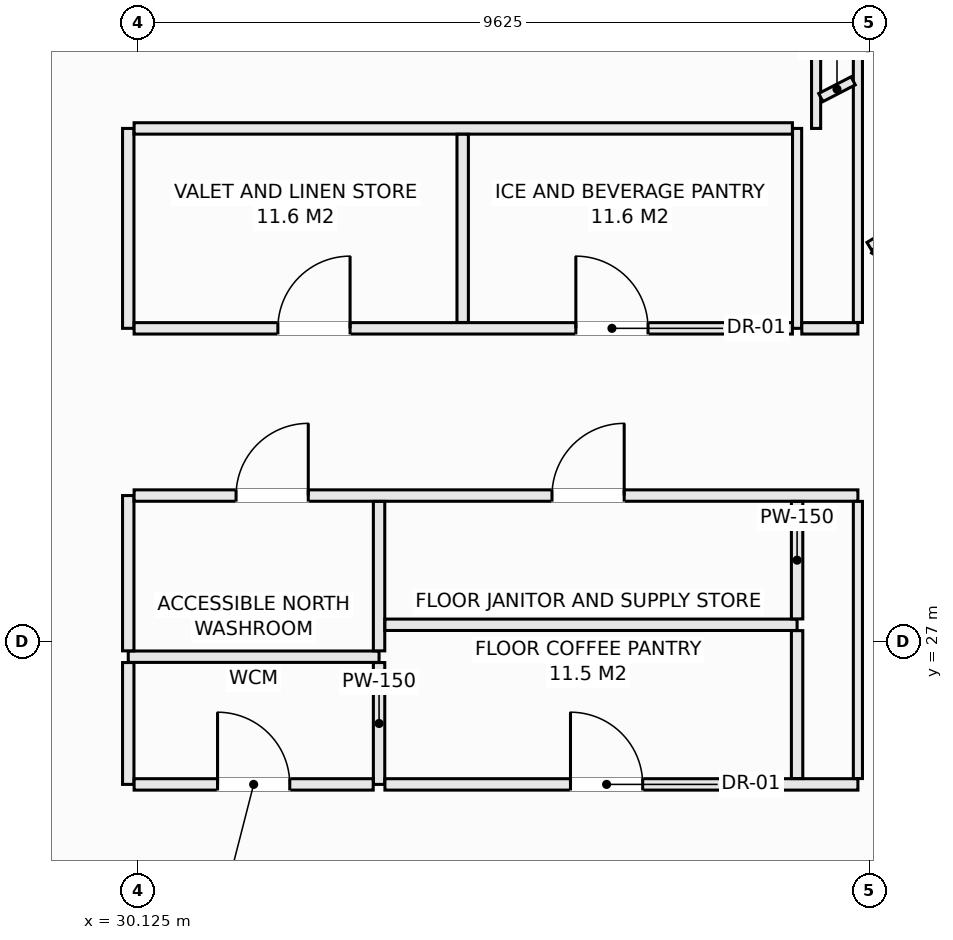
"""IFC4 building model, lengths in metres.
Left out: names, types, materials, properties, quantities, classifications, styles, units other than length and angle.
Written with IfcOpenShell. Run it as: python <this file> out.ifc"""

import sys

from ifc_helpers import new_model, si_unit, direction, frame, frame_2d, origin, place, context, subcontext, project, spatial, rectangle, extrude, element, fill, save


model = new_model("IFC4")
c1 = context("Model", 3, precision=1e-05, world=origin(), true_north=direction((0.0, 1.0)))
c2 = subcontext(c1, "Body", "Model", "MODEL_VIEW")
j1 = project(units=[si_unit("LENGTHUNIT", "METRE"), si_unit("PLANEANGLEUNIT", "RADIAN")], contexts=[c1])
p1 = place(None, origin())
s1 = spatial("IfcSite", under=j1, at=p1, CompositionType="ELEMENT")
p2 = place(p1, origin())
s2 = spatial("IfcBuilding", under=s1, at=p2, CompositionType="ELEMENT")
p3 = place(p2, frame((0.0, 0.0, 216.2)))
s3 = spatial("IfcBuildingStorey", under=s2, at=p3, CompositionType="ELEMENT", Elevation=216.2)
p4 = place(p3, frame((30.0, 26.8, 0.0), z_axis=(0.0, 0.0, 1.0), x_axis=(1.0, 0.0, 0.0)))
e1 = element("IfcWall", 1, at=p4, inside=s3, PredefinedType="PARTITIONING", context=c2, shape_type="SweptSolid", body=[
    extrude(rectangle(XDim=3.3, YDim=0.15, at=frame_2d((1.65, 0.0))), origin(), (0.0, 0.0, 1.0), 3.03),
])
p5 = place(p3, frame((30.0, 25.12, 0.0), z_axis=(0.0, 0.0, 1.0), x_axis=(0.0, 1.0, 0.0)))
e2 = element("IfcWall", 2, at=p5, inside=s3, PredefinedType="PARTITIONING", context=c2, shape_type="SweptSolid", body=[
    extrude(rectangle(XDim=1.603, YDim=0.15, at=frame_2d((0.801, 0.0))), origin(), (0.0, 0.0, 1.0), 3.03),
])
p6 = place(p3, frame((30.0, 26.877, 0.0), z_axis=(0.0, 0.0, 1.0), x_axis=(0.0, 1.0, 0.0)))
e3 = element("IfcWall", 3, at=p6, inside=s3, PredefinedType="PARTITIONING", context=c2, shape_type="SweptSolid", body=[
    extrude(rectangle(XDim=2.043, YDim=0.15, at=frame_2d((1.021, 0.0))), origin(), (0.0, 0.0, 1.0), 3.03),
])
p7 = place(p3, frame((30.0, 31.12, 0.0), z_axis=(0.0, 0.0, 1.0), x_axis=(0.0, 1.0, 0.0)))
e4 = element("IfcWall", 4, at=p7, inside=s3, PredefinedType="PARTITIONING", context=c2, shape_type="SweptSolid", body=[
    extrude(rectangle(XDim=2.63, YDim=0.15, at=frame_2d((1.315, 0.0))), origin(), (0.0, 0.0, 1.0), 3.03),
])
p8 = place(p3, frame((30.077, 28.92, 0.0), z_axis=(0.0, 0.0, 1.0), x_axis=(1.0, 0.0, 0.0)))
e5 = element("IfcWall", 5, at=p8, inside=s3, PredefinedType="PARTITIONING", context=c2, shape_type="SweptSolid", body=[
    extrude(rectangle(XDim=9.523, YDim=0.15, at=frame_2d((4.762, 0.0))), origin(), (0.0, 0.0, 1.0), 3.03),
])
p9 = place(p8, frame((1.342, 0.0, 0.0)))
e6 = element("IfcOpeningElement", 6, at=p9, cuts=e5, PredefinedType="OPENING", context=c2, shape_type="SweptSolid", body=[
    extrude(rectangle(XDim=0.95, YDim=2.1, at=frame_2d((0.475, 1.05))), frame((0.0, 0.085, 0.0), z_axis=(0.0, -1.0, 0.0), x_axis=(1.0, 0.0, 0.0)), (0.0, 0.0, 1.0), 0.17),
])
p10 = place(p8, frame((5.498, 0.0, 0.0)))
e7 = element("IfcOpeningElement", 7, at=p10, cuts=e5, PredefinedType="OPENING", context=c2, shape_type="SweptSolid", body=[
    extrude(rectangle(XDim=0.95, YDim=2.1, at=frame_2d((0.475, 1.05))), frame((0.0, 0.085, 0.0), z_axis=(0.0, -1.0, 0.0), x_axis=(1.0, 0.0, 0.0)), (0.0, 0.0, 1.0), 0.17),
])
p11 = place(p3, frame((33.3, 25.12, 0.0), z_axis=(0.0, 0.0, 1.0), x_axis=(0.0, 1.0, 0.0)))
e8 = element("IfcWall", 8, at=p11, inside=s3, PredefinedType="PARTITIONING", context=c2, shape_type="SweptSolid", body=[
    extrude(rectangle(XDim=1.603, YDim=0.15, at=frame_2d((0.801, 0.0))), origin(), (0.0, 0.0, 1.0), 3.03),
])
p12 = place(p3, frame((33.3, 26.877, 0.0), z_axis=(0.0, 0.0, 1.0), x_axis=(0.0, 1.0, 0.0)))
e9 = element("IfcWall", 9, at=p12, inside=s3, PredefinedType="PARTITIONING", context=c2, shape_type="SweptSolid", body=[
    extrude(rectangle(XDim=1.966, YDim=0.15, at=frame_2d((0.983, 0.0))), origin(), (0.0, 0.0, 1.0), 3.03),
])
p13 = place(p3, frame((30.077, 25.12, 0.0), z_axis=(0.0, 0.0, 1.0), x_axis=(1.0, 0.0, 0.0)))
e10 = element("IfcWall", 10, at=p13, inside=s3, PredefinedType="PARTITIONING", context=c2, shape_type="SweptSolid", body=[
    extrude(rectangle(XDim=3.146, YDim=0.15, at=frame_2d((1.573, 0.0))), origin(), (0.0, 0.0, 1.0), 3.03),
])
p14 = place(p13, frame((1.098, 0.0, 0.0)))
e11 = element("IfcOpeningElement", 11, at=p14, cuts=e10, PredefinedType="OPENING", context=c2, shape_type="SweptSolid", body=[
    extrude(rectangle(XDim=0.95, YDim=2.1, at=frame_2d((0.475, 1.05))), frame((0.0, 0.085, 0.0), z_axis=(0.0, -1.0, 0.0), x_axis=(1.0, 0.0, 0.0)), (0.0, 0.0, 1.0), 0.17),
])
p15 = place(p3, frame((33.377, 25.12, 0.0), z_axis=(0.0, 0.0, 1.0), x_axis=(1.0, 0.0, 0.0)))
e12 = element("IfcWall", 12, at=p15, inside=s3, PredefinedType="PARTITIONING", context=c2, shape_type="SweptSolid", body=[
    extrude(rectangle(XDim=6.223, YDim=0.15, at=frame_2d((3.112, 0.0))), origin(), (0.0, 0.0, 1.0), 3.03),
])
p16 = place(p15, frame((2.441, 0.0, 0.0)))
e13 = element("IfcOpeningElement", 13, at=p16, cuts=e12, PredefinedType="OPENING", context=c2, shape_type="SweptSolid", body=[
    extrude(rectangle(XDim=0.95, YDim=2.1, at=frame_2d((0.475, 1.05))), frame((0.0, 0.085, 0.0), z_axis=(0.0, -1.0, 0.0), x_axis=(1.0, 0.0, 0.0)), (0.0, 0.0, 1.0), 0.17),
])
p17 = place(p3, frame((33.377, 27.22, 0.0), z_axis=(0.0, 0.0, 1.0), x_axis=(1.0, 0.0, 0.0)))
e14 = element("IfcWall", 14, at=p17, inside=s3, PredefinedType="PARTITIONING", context=c2, shape_type="SweptSolid", body=[
    extrude(rectangle(XDim=5.423, YDim=0.15, at=frame_2d((2.711, 0.0))), origin(), (0.0, 0.0, 1.0), 3.03),
])
p18 = place(p3, frame((38.8, 25.197, 0.0), z_axis=(0.0, 0.0, 1.0), x_axis=(0.0, 1.0, 0.0)))
e15 = element("IfcWall", 15, at=p18, inside=s3, PredefinedType="PARTITIONING", context=c2, shape_type="SweptSolid", body=[
    extrude(rectangle(XDim=1.946, YDim=0.15, at=frame_2d((0.973, 0.0))), origin(), (0.0, 0.0, 1.0), 3.03),
])
p19 = place(p3, frame((38.8, 27.297, 0.0), z_axis=(0.0, 0.0, 1.0), x_axis=(0.0, 1.0, 0.0)))
e16 = element("IfcWall", 16, at=p19, inside=s3, PredefinedType="PARTITIONING", context=c2, shape_type="SweptSolid", body=[
    extrude(rectangle(XDim=1.546, YDim=0.15, at=frame_2d((0.773, 0.0))), origin(), (0.0, 0.0, 1.0), 3.03),
])
p20 = place(p3, frame((38.8, 31.12, 0.0), z_axis=(0.0, 0.0, 1.0), x_axis=(0.0, 1.0, 0.0)))
e17 = element("IfcWall", 17, at=p20, inside=s3, PredefinedType="PARTITIONING", context=c2, shape_type="SweptSolid", body=[
    extrude(rectangle(XDim=2.63, YDim=0.12, at=frame_2d((1.315, 0.0))), origin(), (0.0, 0.0, 1.0), 3.03),
])
p21 = place(p3, frame((30.077, 31.12, 0.0), z_axis=(0.0, 0.0, 1.0), x_axis=(1.0, 0.0, 0.0)))
e18 = element("IfcWall", 18, at=p21, inside=s3, PredefinedType="PARTITIONING", context=c2, shape_type="SweptSolid", body=[
    extrude(rectangle(XDim=8.661, YDim=0.15, at=frame_2d((4.331, 0.0))), origin(), (0.0, 0.0, 1.0), 3.03),
])
p22 = place(p21, frame((1.892, 0.0, 0.0)))
e19 = element("IfcOpeningElement", 19, at=p22, cuts=e18, PredefinedType="OPENING", context=c2, shape_type="SweptSolid", body=[
    extrude(rectangle(XDim=0.95, YDim=2.1, at=frame_2d((0.475, 1.05))), frame((0.0, 0.085, 0.0), z_axis=(0.0, -1.0, 0.0), x_axis=(1.0, 0.0, 0.0)), (0.0, 0.0, 1.0), 0.17),
])
p23 = place(p21, frame((5.812, 0.0, 0.0)))
e20 = element("IfcOpeningElement", 20, at=p23, cuts=e18, PredefinedType="OPENING", context=c2, shape_type="SweptSolid", body=[
    extrude(rectangle(XDim=0.95, YDim=2.1, at=frame_2d((0.475, 1.05))), frame((0.0, 0.085, 0.0), z_axis=(0.0, -1.0, 0.0), x_axis=(1.0, 0.0, 0.0)), (0.0, 0.0, 1.0), 0.17),
])
p24 = place(p3, frame((38.862, 31.12, 0.0), z_axis=(0.0, 0.0, 1.0), x_axis=(1.0, 0.0, 0.0)))
e21 = element("IfcWall", 21, at=p24, inside=s3, PredefinedType="PARTITIONING", context=c2, shape_type="SweptSolid", body=[
    extrude(rectangle(XDim=0.738, YDim=0.15, at=frame_2d((0.369, 0.0))), origin(), (0.0, 0.0, 1.0), 3.03),
])
p25 = place(p3, frame((30.077, 33.75, 0.0), z_axis=(0.0, 0.0, 1.0), x_axis=(1.0, 0.0, 0.0)))
e22 = element("IfcWall", 22, at=p25, inside=s3, PredefinedType="PARTITIONING", context=c2, shape_type="SweptSolid", body=[
    extrude(rectangle(XDim=8.661, YDim=0.15, at=frame_2d((4.331, 0.0))), origin(), (0.0, 0.0, 1.0), 3.03),
])
p26 = place(p3, frame((34.4, 31.197, 0.0), z_axis=(0.0, 0.0, 1.0), x_axis=(0.0, 1.0, 0.0)))
e23 = element("IfcWall", 23, at=p26, inside=s3, PredefinedType="PARTITIONING", context=c2, shape_type="SweptSolid", body=[
    extrude(rectangle(XDim=2.476, YDim=0.15, at=frame_2d((1.238, 0.0))), origin(), (0.0, 0.0, 1.0), 3.03),
])
p27 = place(p3, frame((39.05, 33.75, 0.0), z_axis=(0.0, 0.0, 1.0), x_axis=(0.0, 1.0, 0.0)))
e24 = element("IfcWall", 24, at=p27, inside=s3, PredefinedType="PARTITIONING", context=c2, shape_type="SweptSolid", body=[
    extrude(rectangle(XDim=1.938, YDim=0.12, at=frame_2d((0.969, 0.0))), origin(), (0.0, 0.0, 1.0), 3.03),
])
p28 = place(p3, frame((39.6, 25.197, 0.0), z_axis=(0.0, 0.0, 1.0), x_axis=(0.0, 1.0, 0.0)))
e25 = element("IfcWall", 25, at=p28, inside=s3, PredefinedType="PARTITIONING", context=c2, shape_type="SweptSolid", body=[
    extrude(rectangle(XDim=3.646, YDim=0.12, at=frame_2d((1.823, 0.0))), origin(), (0.0, 0.0, 1.0), 3.03),
])
p29 = place(p3, frame((39.6, 31.197, 0.0), z_axis=(0.0, 0.0, 1.0), x_axis=(0.0, 1.0, 0.0)))
e26 = element("IfcWall", 26, at=p29, inside=s3, PredefinedType="PARTITIONING", context=c2, shape_type="SweptSolid", body=[
    extrude(rectangle(XDim=6.303, YDim=0.12, at=frame_2d((3.151, 0.0))), origin(), (0.0, 0.0, 1.0), 3.03),
])
p30 = place(p3, frame((39.75, 32.199, 0.0), z_axis=(0.0, 0.0, 1.0), x_axis=(0.857702120906, 0.514146935996, 0.0)))
e27 = element("IfcWall", 27, at=p30, inside=s3, PredefinedType="PARTITIONING", context=c2, shape_type="SweptSolid", body=[
    extrude(rectangle(XDim=1.441, YDim=0.12, at=frame_2d((0.721, 0.0))), origin(), (0.0, 0.0, 1.0), 3.03),
])
p31 = place(p3, frame((39.81, 32.163, 0.0), z_axis=(0.0, 0.0, 1.0), x_axis=(0.858011245414, -0.513630901273, 0.0)))
e28 = element("IfcWall", 28, at=p31, inside=s3, PredefinedType="PARTITIONING", context=c2, shape_type="SweptSolid", body=[
    extrude(rectangle(XDim=1.37, YDim=0.12, at=frame_2d((0.685, 0.0))), origin(), (0.0, 0.0, 1.0), 3.03),
])
p32 = place(p3, frame((39.112, 34.156, 0.0), z_axis=(0.0, 0.0, 1.0), x_axis=(0.888547006739, 0.458785589153, 0.0)))
e29 = element("IfcWall", 29, at=p32, inside=s3, PredefinedType="PARTITIONING", context=c2, shape_type="SweptSolid", body=[
    extrude(rectangle(XDim=0.479, YDim=0.12, at=frame_2d((0.24, 0.0))), origin(), (0.0, 0.0, 1.0), 3.03),
])
p33 = place(p9, origin())
e30 = element("IfcDoor", 30, at=p33, inside=s3, OperationType="SINGLE_SWING_RIGHT", PredefinedType="DOOR", context=c2, shape_type="SweptSolid", body=[
    extrude(rectangle(XDim=0.95, YDim=2.1, at=frame_2d((0.475, 1.05))), frame((0.0, 0.025, 0.0), z_axis=(0.0, -1.0, 0.0), x_axis=(1.0, 0.0, 0.0)), (0.0, 0.0, 1.0), 0.05),
])
fill(e6, e30)
p34 = place(p14, origin())
e31 = element("IfcDoor", 31, at=p34, inside=s3, OperationType="SINGLE_SWING_LEFT", PredefinedType="DOOR", context=c2, shape_type="SweptSolid", body=[
    extrude(rectangle(XDim=0.95, YDim=2.1, at=frame_2d((0.475, 1.05))), frame((0.0, 0.025, 0.0), z_axis=(0.0, -1.0, 0.0), x_axis=(1.0, 0.0, 0.0)), (0.0, 0.0, 1.0), 0.05),
])
fill(e11, e31)
p35 = place(p10, origin())
e32 = element("IfcDoor", 32, at=p35, inside=s3, OperationType="SINGLE_SWING_RIGHT", PredefinedType="DOOR", context=c2, shape_type="SweptSolid", body=[
    extrude(rectangle(XDim=0.95, YDim=2.1, at=frame_2d((0.475, 1.05))), frame((0.0, 0.025, 0.0), z_axis=(0.0, -1.0, 0.0), x_axis=(1.0, 0.0, 0.0)), (0.0, 0.0, 1.0), 0.05),
])
fill(e7, e32)
p36 = place(p16, origin())
e33 = element("IfcDoor", 33, at=p36, inside=s3, OperationType="SINGLE_SWING_LEFT", PredefinedType="DOOR", context=c2, shape_type="SweptSolid", body=[
    extrude(rectangle(XDim=0.95, YDim=2.1, at=frame_2d((0.475, 1.05))), frame((0.0, 0.025, 0.0), z_axis=(0.0, -1.0, 0.0), x_axis=(1.0, 0.0, 0.0)), (0.0, 0.0, 1.0), 0.05),
])
fill(e13, e33)
p37 = place(p22, origin())
e34 = element("IfcDoor", 34, at=p37, inside=s3, OperationType="SINGLE_SWING_RIGHT", PredefinedType="DOOR", context=c2, shape_type="SweptSolid", body=[
    extrude(rectangle(XDim=0.95, YDim=2.1, at=frame_2d((0.475, 1.05))), frame((0.0, 0.025, 0.0), z_axis=(0.0, -1.0, 0.0), x_axis=(1.0, 0.0, 0.0)), (0.0, 0.0, 1.0), 0.05),
])
fill(e19, e34)
p38 = place(p23, origin())
e35 = element("IfcDoor", 35, at=p38, inside=s3, OperationType="SINGLE_SWING_LEFT", PredefinedType="DOOR", context=c2, shape_type="SweptSolid", body=[
    extrude(rectangle(XDim=0.95, YDim=2.1, at=frame_2d((0.475, 1.05))), frame((0.0, 0.025, 0.0), z_axis=(0.0, -1.0, 0.0), x_axis=(1.0, 0.0, 0.0)), (0.0, 0.0, 1.0), 0.05),
])
fill(e20, e35)
save(model, sys.argv[1])
